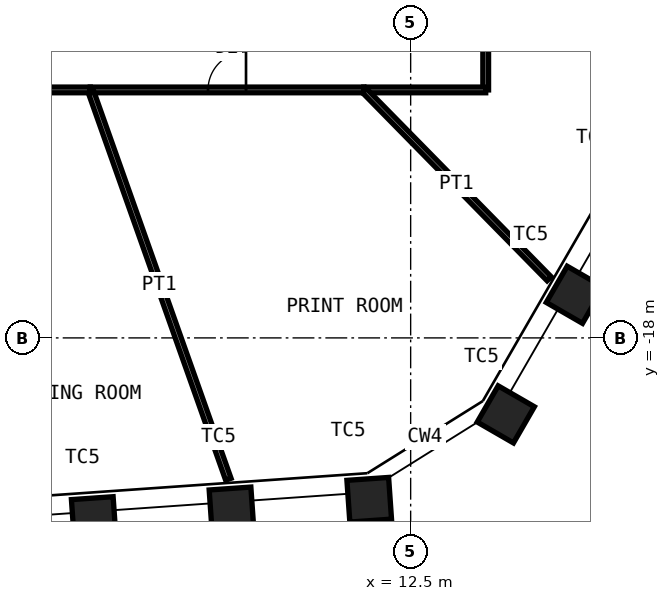
"""IFC4 building model, lengths in metres.
Left out: names, types, materials, properties, quantities, classifications, styles, units other than length and angle.
Written with IfcOpenShell. Run it as: python <this file> out.ifc"""

import sys

from ifc_helpers import new_model, si_unit, direction, frame, frame_2d, origin, origin_2d, place, context, subcontext, project, spatial, rectangle, hollow_rectangle, extrude, element, fill, save


model = new_model("IFC4")
c1 = context("Model", 3, precision=1e-05, world=origin(), true_north=direction((0.0, 1.0)))
c2 = subcontext(c1, "Body", "Model", "MODEL_VIEW")
j1 = project(units=[si_unit("LENGTHUNIT", "METRE"), si_unit("PLANEANGLEUNIT", "RADIAN")], contexts=[c1])
p1 = place(None, origin())
s1 = spatial("IfcSite", under=j1, at=p1, CompositionType="ELEMENT")
p2 = place(p1, origin())
s2 = spatial("IfcBuilding", under=s1, at=p2, CompositionType="ELEMENT")
p3 = place(p2, frame((0.0, 0.0, 214.0)))
s3 = spatial("IfcBuildingStorey", under=s2, at=p3, CompositionType="ELEMENT", Elevation=214.0)
for number, where, z_axis, x_axis in (
    (1, (16.821, -16.866, 0.0), (0.0, 0.0, 1.0), (0.5, 0.866, 0.0)),
    (2, (15.004, -20.012, 0.0), (0.0, 0.0, 1.0), (0.5, 0.866, 0.0)),
    (3, (11.41, -22.258, 0.0), (0.0, 0.0, 1.0), (0.998, 0.07, 0.0)),
    (4, (7.785, -22.512, 0.0), (0.0, 0.0, 1.0), (0.998, 0.07, 0.0)),
    (5, (4.16, -22.765, 0.0), (0.0, 0.0, 1.0), (0.998, 0.07, 0.0)),
):
    element("IfcColumn", number, at=place(p3, frame(where, z_axis=z_axis, x_axis=x_axis)), inside=s3, PredefinedType="COLUMN", context=c2, shape_type="SweptSolid", body=[
        extrude(hollow_rectangle(XDim=1.1, YDim=1.1, WallThickness=0.07, at=origin_2d()), origin(), (0.0, 0.0, 1.0), 4.2),
    ])
p4 = place(p3, frame((14.475, -4.727, 0.0), z_axis=(0.0, 0.0, 1.0), x_axis=(0.0, -1.0, 0.0)))
e6 = element("IfcWall", 6, at=p4, inside=s3, PredefinedType="PARTITIONING", context=c2, shape_type="SweptSolid", body=[
    extrude(rectangle(XDim=6.748, YDim=0.15, at=frame_2d((3.374, 0.0))), origin(), (0.0, 0.0, 1.0), 4.03),
])
p5 = place(p4, frame((2.474, 0.0, 0.0)))
e7 = element("IfcOpeningElement", 7, at=p5, cuts=e6, PredefinedType="OPENING", context=c2, shape_type="SweptSolid", body=[
    extrude(rectangle(XDim=1.8, YDim=2.4, at=frame_2d((0.9, 1.2))), frame((0.0, 0.085, 0.0), z_axis=(0.0, -1.0, 0.0), x_axis=(1.0, 0.0, 0.0)), (0.0, 0.0, 1.0), 0.17),
])
p6 = place(p3, frame((14.475, -11.475, 0.0), z_axis=(0.0, 0.0, 1.0), x_axis=(-1.0, 0.0, 0.0)))
e8 = element("IfcWall", 8, at=p6, inside=s3, PredefinedType="PARTITIONING", context=c2, shape_type="SweptSolid", body=[
    extrude(rectangle(XDim=3.209, YDim=0.15, at=frame_2d((1.605, 0.0))), origin(), (0.0, 0.0, 1.0), 4.03),
])
p7 = place(p3, frame((16.145, -16.444, 0.0), z_axis=(0.0, 0.0, 1.0), x_axis=(-0.700591378209, 0.71356269576, 0.0)))
e9 = element("IfcWall", 9, at=p7, inside=s3, PredefinedType="PARTITIONING", context=c2, shape_type="SweptSolid", body=[
    extrude(rectangle(XDim=6.964, YDim=0.15, at=frame_2d((3.482, 0.0))), origin(), (0.0, 0.0, 1.0), 3.43),
])
p8 = place(p3, frame((11.266, -11.475, 0.0), z_axis=(0.0, 0.0, 1.0), x_axis=(-1.0, 0.0, 0.0)))
e10 = element("IfcWall", 10, at=p8, inside=s3, PredefinedType="PARTITIONING", context=c2, shape_type="SweptSolid", body=[
    extrude(rectangle(XDim=7.196, YDim=0.15, at=frame_2d((3.598, 0.0))), origin(), (0.0, 0.0, 1.0), 4.03),
])
p9 = place(p8, frame((3.098, 0.0, 0.0)))
e11 = element("IfcOpeningElement", 11, at=p9, cuts=e10, PredefinedType="OPENING", context=c2, shape_type="SweptSolid", body=[
    extrude(rectangle(XDim=1.0, YDim=2.4, at=frame_2d((0.5, 1.2))), frame((0.0, 0.085, 0.0), z_axis=(0.0, -1.0, 0.0), x_axis=(1.0, 0.0, 0.0)), (0.0, 0.0, 1.0), 0.17),
])
p10 = place(p3, frame((7.703, -21.719, 0.0), z_axis=(0.0, 0.0, 1.0), x_axis=(-0.334269551553, 0.942477515331, 0.0)))
e12 = element("IfcWall", 12, at=p10, inside=s3, PredefinedType="PARTITIONING", context=c2, shape_type="SweptSolid", body=[
    extrude(rectangle(XDim=10.869, YDim=0.15, at=frame_2d((5.435, 0.0))), origin(), (0.0, 0.0, 1.0), 3.43),
])
p11 = place(p3, frame((4.07, -11.475, 0.0), z_axis=(0.0, 0.0, 1.0), x_axis=(-1.0, 0.0, 0.0)))
e13 = element("IfcWall", 13, at=p11, inside=s3, PredefinedType="PARTITIONING", context=c2, shape_type="SweptSolid", body=[
    extrude(rectangle(XDim=3.819, YDim=0.15, at=frame_2d((1.91, 0.0))), origin(), (0.0, 0.0, 1.0), 4.03),
])
p12 = place(p11, frame((1.41, 0.0, 0.0)))
e14 = element("IfcOpeningElement", 14, at=p12, cuts=e13, PredefinedType="OPENING", context=c2, shape_type="SweptSolid", body=[
    extrude(rectangle(XDim=1.0, YDim=2.4, at=frame_2d((0.5, 1.2))), frame((0.0, 0.085, 0.0), z_axis=(0.0, -1.0, 0.0), x_axis=(1.0, 0.0, 0.0)), (0.0, 0.0, 1.0), 0.17),
])
p13 = place(p9, origin())
e15 = element("IfcDoor", 15, at=p13, inside=s3, OperationType="SINGLE_SWING_LEFT", PredefinedType="DOOR", context=c2, shape_type="SweptSolid", body=[
    extrude(rectangle(XDim=1.0, YDim=2.4, at=frame_2d((0.5, 1.2))), frame((0.0, 0.025, 0.0), z_axis=(0.0, -1.0, 0.0), x_axis=(1.0, 0.0, 0.0)), (0.0, 0.0, 1.0), 0.05),
])
fill(e11, e15)
save(model, sys.argv[1])
